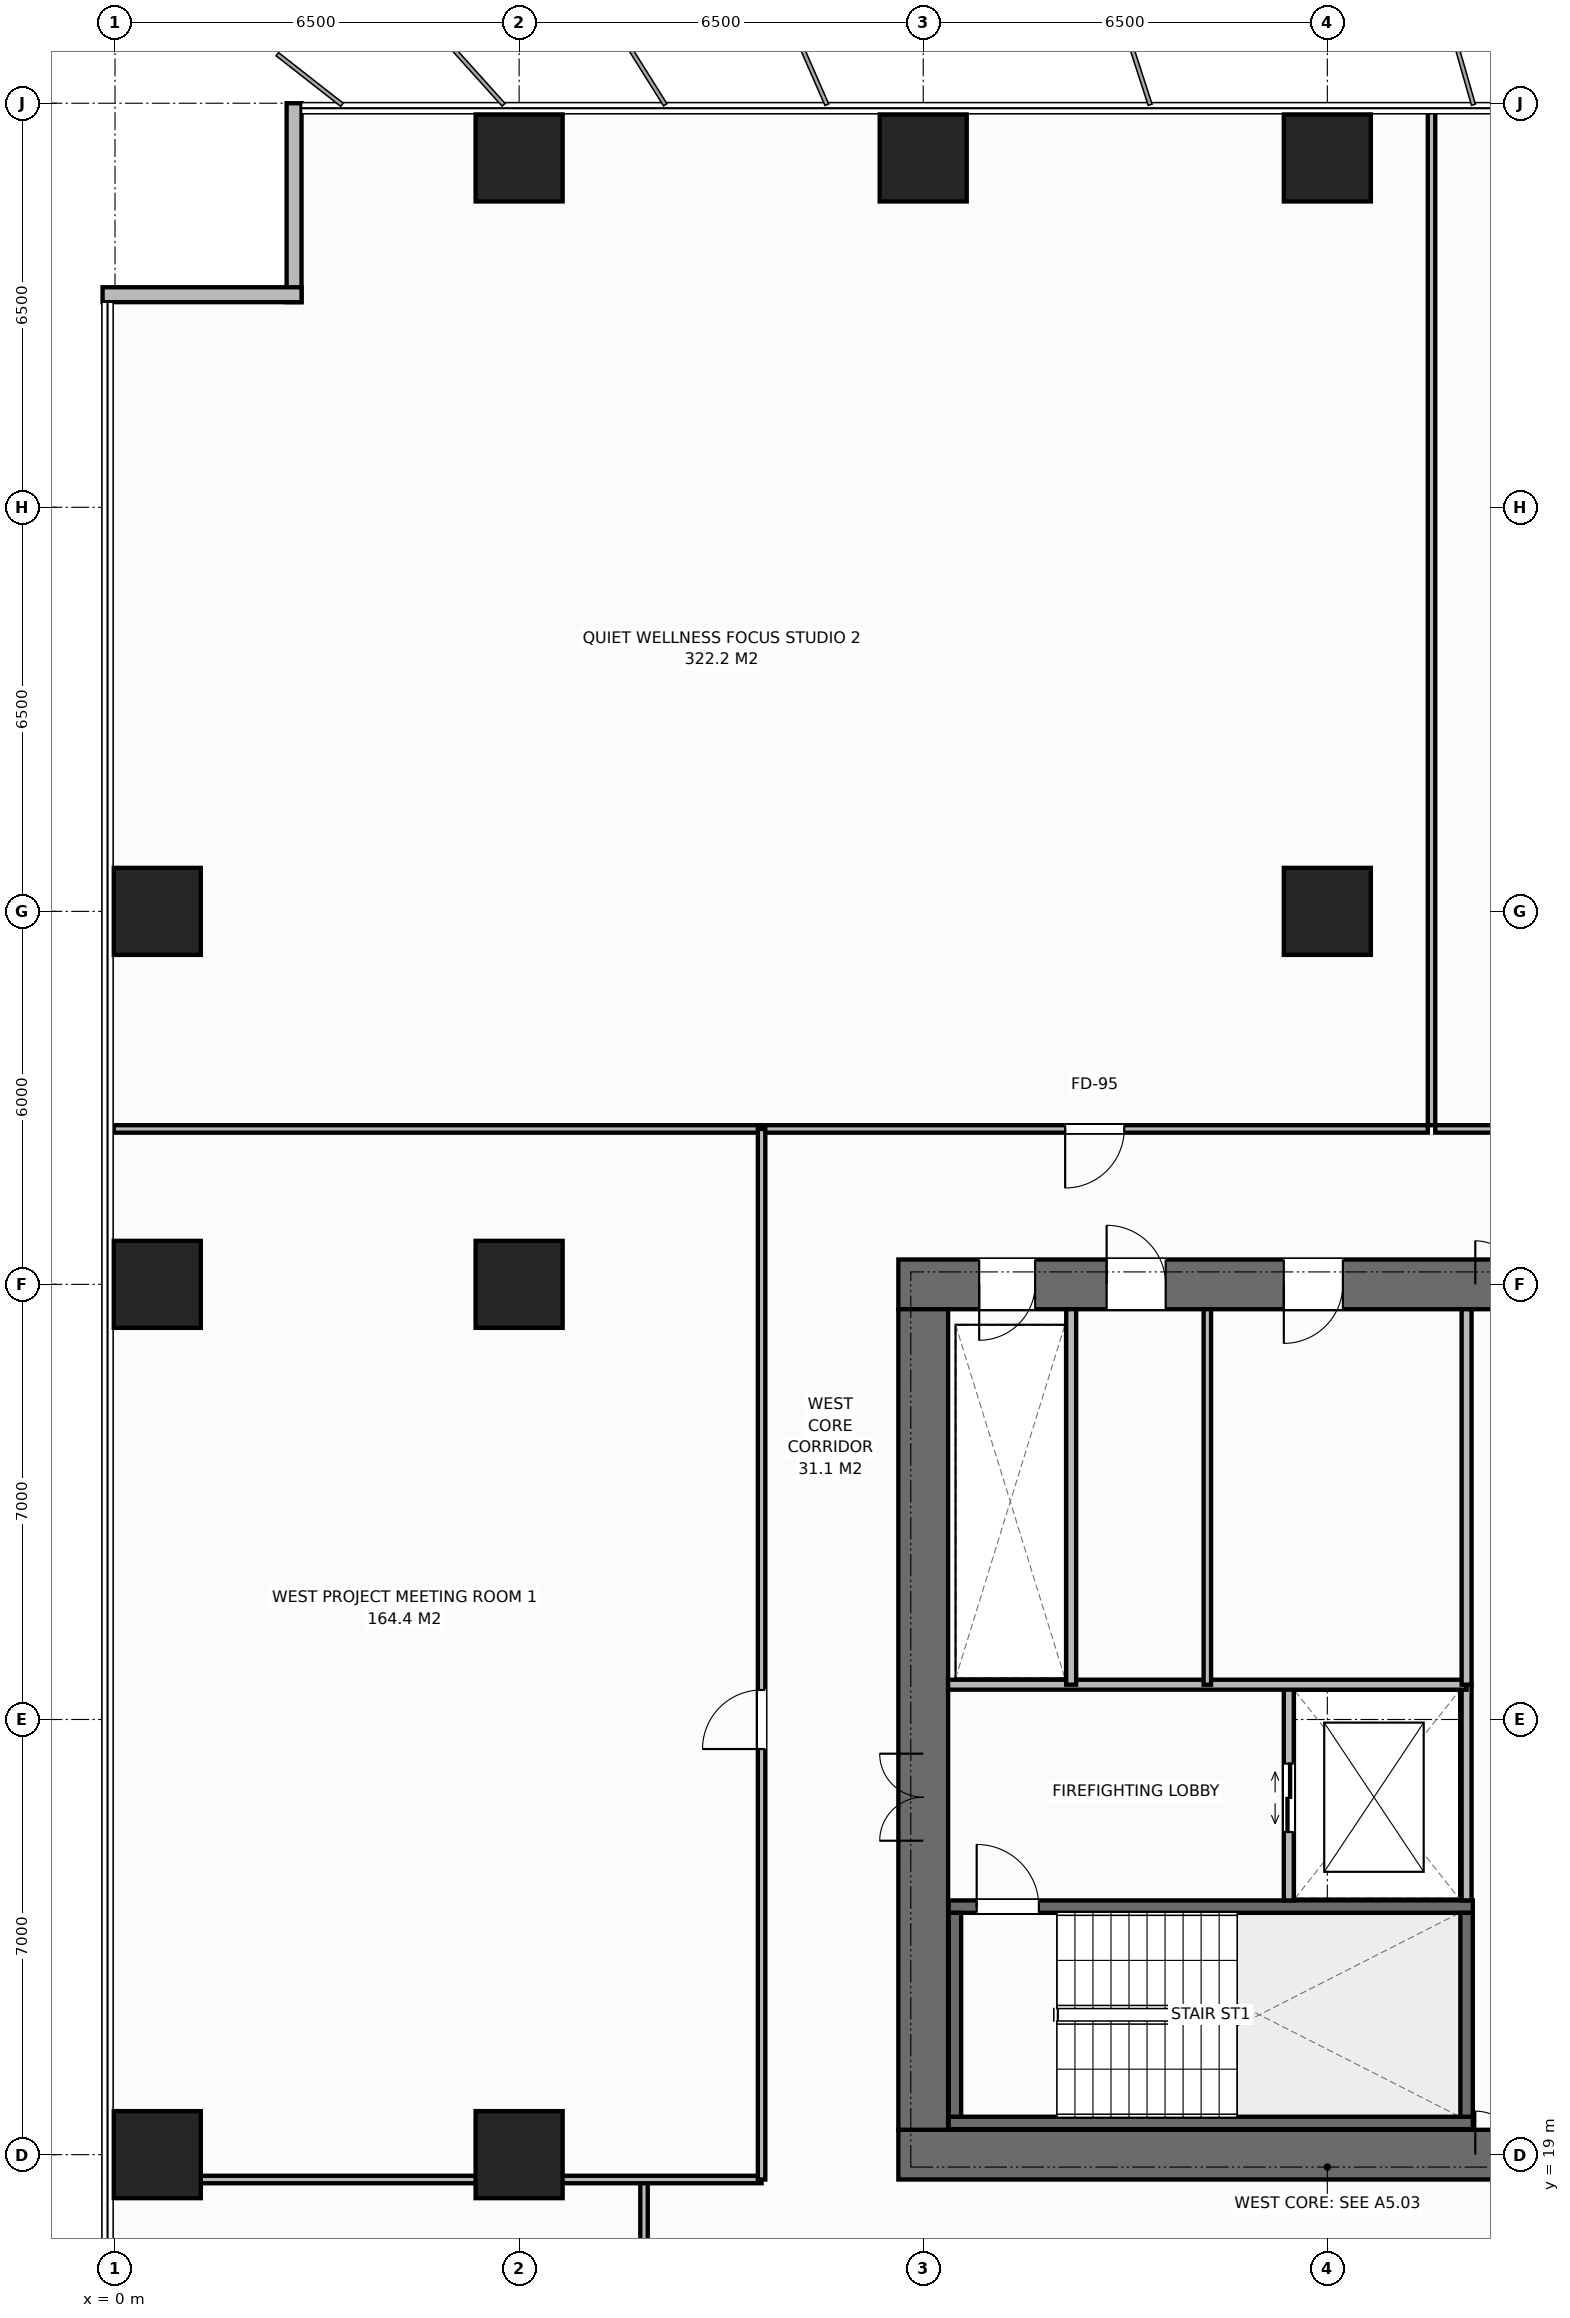
"""IFC4 building model, lengths in metres.
Left out: names, types, materials, properties, quantities, classifications, styles, units other than length and angle.
Written with IfcOpenShell. Run it as: python <this file> out.ifc"""

import sys

from ifc_helpers import new_model, si_unit, direction, frame, frame_2d, origin, origin_2d, place, context, subcontext, project, spatial, rectangle, extrude, element, fill, save


model = new_model("IFC4")
c1 = context("Model", 3, precision=1e-05, world=origin(), true_north=direction((0.0, 1.0)))
c2 = subcontext(c1, "Body", "Model", "MODEL_VIEW")
j1 = project(units=[si_unit("LENGTHUNIT", "METRE"), si_unit("PLANEANGLEUNIT", "RADIAN")], contexts=[c1])
p1 = place(None, origin())
s1 = spatial("IfcSite", under=j1, at=p1, CompositionType="ELEMENT")
p2 = place(p1, origin())
s2 = spatial("IfcBuilding", under=s1, at=p2, CompositionType="ELEMENT")
p3 = place(p2, frame((0.0, 0.0, 65.8)))
s3 = spatial("IfcBuildingStorey", under=s2, at=p3, CompositionType="ELEMENT", Elevation=65.8)
p4 = place(p3, frame((12.6, 19.0, 0.0), z_axis=(0.0, 0.0, 1.0), x_axis=(1.0, 0.0, 0.0)))
e1 = element("IfcWall", 1, at=p4, inside=s3, PredefinedType="SHEAR", context=c2, shape_type="SweptSolid", body=[
    extrude(rectangle(XDim=13.8, YDim=0.8, at=frame_2d((6.9, 0.0))), origin(), (0.0, 0.0, 1.0), 3.8),
])
p5 = place(p4, frame((9.28, 0.0, 0.0)))
e2 = element("IfcOpeningElement", 2, at=p5, cuts=e1, PredefinedType="OPENING", context=c2, shape_type="SweptSolid", body=[
    extrude(rectangle(XDim=1.4, YDim=2.2, at=frame_2d((0.7, 1.1))), frame((0.0, 0.41, 0.0), z_axis=(0.0, -1.0, 0.0), x_axis=(1.0, 0.0, 0.0)), (0.0, 0.0, 1.0), 0.82),
])
p6 = place(p3, frame((12.6, 33.0, 0.0), z_axis=(0.0, 0.0, 1.0), x_axis=(1.0, 0.0, 0.0)))
e3 = element("IfcWall", 3, at=p6, inside=s3, PredefinedType="SHEAR", context=c2, shape_type="SweptSolid", body=[
    extrude(rectangle(XDim=13.8, YDim=0.8, at=frame_2d((6.9, 0.0))), origin(), (0.0, 0.0, 1.0), 3.8),
])
p7 = place(p6, frame((1.3, 0.0, 0.0)))
e4 = element("IfcOpeningElement", 4, at=p7, cuts=e3, PredefinedType="OPENING", context=c2, shape_type="SweptSolid", body=[
    extrude(rectangle(XDim=0.9, YDim=2.15, at=frame_2d((0.45, 1.075))), frame((0.0, 0.41, 0.0), z_axis=(0.0, -1.0, 0.0), x_axis=(1.0, 0.0, 0.0)), (0.0, 0.0, 1.0), 0.82),
])
p8 = place(p6, frame((3.35, 0.0, 0.0)))
e5 = element("IfcOpeningElement", 5, at=p8, cuts=e3, PredefinedType="OPENING", context=c2, shape_type="SweptSolid", body=[
    extrude(rectangle(XDim=0.95, YDim=2.15, at=frame_2d((0.475, 1.075))), frame((0.0, 0.41, 0.0), z_axis=(0.0, -1.0, 0.0), x_axis=(1.0, 0.0, 0.0)), (0.0, 0.0, 1.0), 0.82),
])
p9 = place(p6, frame((6.2, 0.0, 0.0)))
e6 = element("IfcOpeningElement", 6, at=p9, cuts=e3, PredefinedType="OPENING", context=c2, shape_type="SweptSolid", body=[
    extrude(rectangle(XDim=0.95, YDim=2.15, at=frame_2d((0.475, 1.075))), frame((0.0, 0.41, 0.0), z_axis=(0.0, -1.0, 0.0), x_axis=(1.0, 0.0, 0.0)), (0.0, 0.0, 1.0), 0.82),
])
p10 = place(p6, frame((9.28, 0.0, 0.0)))
e7 = element("IfcOpeningElement", 7, at=p10, cuts=e3, PredefinedType="OPENING", context=c2, shape_type="SweptSolid", body=[
    extrude(rectangle(XDim=1.4, YDim=2.2, at=frame_2d((0.7, 1.1))), frame((0.0, 0.41, 0.0), z_axis=(0.0, -1.0, 0.0), x_axis=(1.0, 0.0, 0.0)), (0.0, 0.0, 1.0), 0.82),
])
p11 = place(p3, frame((13.0, 19.4, 0.0), z_axis=(0.0, 0.0, 1.0), x_axis=(0.0, 1.0, 0.0)))
e8 = element("IfcWall", 8, at=p11, inside=s3, PredefinedType="SHEAR", context=c2, shape_type="SweptSolid", body=[
    extrude(rectangle(XDim=13.2, YDim=0.8, at=frame_2d((6.6, 0.0))), origin(), (0.0, 0.0, 1.0), 3.8),
])
p12 = place(p11, frame((4.65, 0.0, 0.0)))
e9 = element("IfcOpeningElement", 9, at=p12, cuts=e8, PredefinedType="OPENING", context=c2, shape_type="SweptSolid", body=[
    extrude(rectangle(XDim=1.4, YDim=2.2, at=frame_2d((0.7, 1.1))), frame((0.0, 0.41, 0.0), z_axis=(0.0, -1.0, 0.0), x_axis=(1.0, 0.0, 0.0)), (0.0, 0.0, 1.0), 0.82),
])
p13 = place(p3, frame((13.41, 19.51, 0.0), z_axis=(0.0, 0.0, 1.0), x_axis=(1.0, 0.0, 0.0)))
e10 = element("IfcWall", 10, at=p13, inside=s3, PredefinedType="SHEAR", context=c2, shape_type="SweptSolid", body=[
    extrude(rectangle(XDim=8.43, YDim=0.2, at=frame_2d((4.215, 0.0))), origin(), (0.0, 0.0, 1.0), 3.8),
])
p14 = place(p3, frame((13.41, 22.99, 0.0), z_axis=(0.0, 0.0, 1.0), x_axis=(1.0, 0.0, 0.0)))
e11 = element("IfcWall", 11, at=p14, inside=s3, PredefinedType="SHEAR", context=c2, shape_type="SweptSolid", body=[
    extrude(rectangle(XDim=8.43, YDim=0.2, at=frame_2d((4.215, 0.0))), origin(), (0.0, 0.0, 1.0), 3.8),
])
p15 = place(p14, frame((0.45, 0.0, 0.0)))
e12 = element("IfcOpeningElement", 12, at=p15, cuts=e11, PredefinedType="OPENING", context=c2, shape_type="SweptSolid", body=[
    extrude(rectangle(XDim=1.0, YDim=2.15, at=frame_2d((0.5, 1.075))), frame((0.0, 0.11, 0.0), z_axis=(0.0, -1.0, 0.0), x_axis=(1.0, 0.0, 0.0)), (0.0, 0.0, 1.0), 0.22),
])
for number, where, z_axis, x_axis in (
    (13, (13.51, 19.61, 0.0), (0.0, 0.0, 1.0), (0.0, 1.0, 0.0)),
    (14, (21.74, 19.61, 0.0), (0.0, 0.0, 1.0), (0.0, 1.0, 0.0)),
):
    element("IfcWall", number, at=place(p3, frame(where, z_axis=z_axis, x_axis=x_axis)), inside=s3, PredefinedType="SHEAR", context=c2, shape_type="SweptSolid", body=[
        extrude(rectangle(XDim=3.28, YDim=0.2, at=frame_2d((1.64, 0.0))), origin(), (0.0, 0.0, 1.0), 3.8),
    ])
for number, where, z_axis, x_axis in (
    (15, (19.5, 39.0, 0.0), (0.0, 0.0, 1.0), (1.0, 0.0, 0.0)),
    (16, (6.5, 19.0, 0.0), (0.0, 0.0, 1.0), (1.0, 0.0, 0.0)),
    (17, (6.5, 33.0, 0.0), (0.0, 0.0, 1.0), (1.0, 0.0, 0.0)),
    (18, (6.5, 51.12, 0.0), (0.0, 0.0, 1.0), (1.0, 0.0, 0.0)),
    (19, (13.0, 51.12, 0.0), (0.0, 0.0, 1.0), (1.0, 0.0, 0.0)),
    (20, (19.5, 51.12, 0.0), (0.0, 0.0, 1.0), (1.0, 0.0, 0.0)),
    (21, (0.68, 19.0, 0.0), (0.0, 0.0, 1.0), (1.0, 0.0, 0.0)),
    (22, (0.68, 33.0, 0.0), (0.0, 0.0, 1.0), (1.0, 0.0, 0.0)),
    (23, (0.68, 39.0, 0.0), (0.0, 0.0, 1.0), (1.0, 0.0, 0.0)),
):
    element("IfcColumn", number, at=place(p3, frame(where, z_axis=z_axis, x_axis=x_axis)), inside=s3, PredefinedType="COLUMN", context=c2, shape_type="SweptSolid", body=[
        extrude(rectangle(XDim=1.4, YDim=1.4, at=origin_2d()), origin(), (0.0, 0.0, 1.0), 3.8),
    ])
for number, where, z_axis, x_axis in (
    (24, (2.88, 48.8, 0.0), (0.0, 0.0, 1.0), (0.0, 1.0, 0.0)),
    (25, (-0.2, 48.92, 0.0), (0.0, 0.0, 1.0), (1.0, 0.0, 0.0)),
):
    element("IfcWall", number, at=place(p3, frame(where, z_axis=z_axis, x_axis=x_axis)), inside=s3, PredefinedType="STANDARD", context=c2, shape_type="SweptSolid", body=[
        extrude(rectangle(XDim=3.2, YDim=0.24, at=frame_2d((1.6, 0.0))), origin(), (0.0, 0.0, 1.0), 3.55),
    ])
p16 = place(p3, frame((21.74, 23.09, 0.0), z_axis=(0.0, 0.0, 1.0), x_axis=(0.0, 1.0, 0.0)))
e26 = element("IfcWall", 26, at=p16, inside=s3, PredefinedType="STANDARD", context=c2, shape_type="SweptSolid", body=[
    extrude(rectangle(XDim=3.47, YDim=0.16, at=frame_2d((1.735, 0.0))), origin(), (0.0, 0.0, 1.0), 3.55),
])
p17 = place(p3, frame((18.88, 23.09, 0.0), z_axis=(0.0, 0.0, 1.0), x_axis=(0.0, 1.0, 0.0)))
e27 = element("IfcWall", 27, at=p17, inside=s3, PredefinedType="STANDARD", context=c2, shape_type="SweptSolid", body=[
    extrude(rectangle(XDim=3.47, YDim=0.16, at=frame_2d((1.735, 0.0))), origin(), (0.0, 0.0, 1.0), 3.55),
])
p18 = place(p17, frame((1.1, 0.0, 0.0)))
e28 = element("IfcOpeningElement", 28, at=p18, cuts=e27, PredefinedType="OPENING", context=c2, shape_type="SweptSolid", body=[
    extrude(rectangle(XDim=1.1, YDim=2.2, at=frame_2d((0.55, 1.1))), frame((0.0, 0.09, 0.0), z_axis=(0.0, -1.0, 0.0), x_axis=(1.0, 0.0, 0.0)), (0.0, 0.0, 1.0), 0.18),
])
p19 = place(p3, frame((13.4, 26.56, 0.0), z_axis=(0.0, 0.0, 1.0), x_axis=(1.0, 0.0, 0.0)))
e29 = element("IfcWall", 29, at=p19, inside=s3, PredefinedType="STANDARD", context=c2, shape_type="SweptSolid", body=[
    extrude(rectangle(XDim=8.34, YDim=0.16, at=frame_2d((4.17, 0.0))), origin(), (0.0, 0.0, 1.0), 3.55),
])
p20 = place(p3, frame((15.38, 26.56, 0.0), z_axis=(0.0, 0.0, 1.0), x_axis=(0.0, 1.0, 0.0)))
e30 = element("IfcWall", 30, at=p20, inside=s3, PredefinedType="STANDARD", context=c2, shape_type="SweptSolid", body=[
    extrude(rectangle(XDim=6.04, YDim=0.16, at=frame_2d((3.02, 0.0))), origin(), (0.0, 0.0, 1.0), 3.55),
])
p21 = place(p3, frame((17.57, 26.56, 0.0), z_axis=(0.0, 0.0, 1.0), x_axis=(0.0, 1.0, 0.0)))
e31 = element("IfcWall", 31, at=p21, inside=s3, PredefinedType="PARTITIONING", context=c2, shape_type="SweptSolid", body=[
    extrude(rectangle(XDim=6.04, YDim=0.12, at=frame_2d((3.02, 0.0))), origin(), (0.0, 0.0, 1.0), 3.55),
])
p22 = place(p3, frame((21.74, 26.56, 0.0), z_axis=(0.0, 0.0, 1.0), x_axis=(0.0, 1.0, 0.0)))
e32 = element("IfcWall", 32, at=p22, inside=s3, PredefinedType="STANDARD", context=c2, shape_type="SweptSolid", body=[
    extrude(rectangle(XDim=6.04, YDim=0.16, at=frame_2d((3.02, 0.0))), origin(), (0.0, 0.0, 1.0), 3.55),
])
p23 = place(p3, frame((8.509, 16.5, 0.0), z_axis=(0.0, 0.0, 1.0), x_axis=(0.0, 1.0, 0.0)))
e33 = element("IfcWall", 33, at=p23, inside=s3, PredefinedType="PARTITIONING", context=c2, shape_type="SweptSolid", body=[
    extrude(rectangle(XDim=2.1, YDim=0.12, at=frame_2d((1.05, 0.0))), origin(), (0.0, 0.0, 1.0), 3.55),
])
p24 = place(p3, frame((21.176, 35.56, 0.0), z_axis=(0.0, 0.0, 1.0), x_axis=(0.0, 1.0, 0.0)))
e34 = element("IfcWall", 34, at=p24, inside=s3, PredefinedType="PARTITIONING", context=c2, shape_type="SweptSolid", body=[
    extrude(rectangle(XDim=16.42, YDim=0.12, at=frame_2d((8.21, 0.0))), origin(), (0.0, 0.0, 1.0), 3.55),
])
p25 = place(p3, frame((-0.02, 35.5, 0.0), z_axis=(0.0, 0.0, 1.0), x_axis=(1.0, 0.0, 0.0)))
e35 = element("IfcWall", 35, at=p25, inside=s3, PredefinedType="PARTITIONING", context=c2, shape_type="SweptSolid", body=[
    extrude(rectangle(XDim=21.136, YDim=0.12, at=frame_2d((10.568, 0.0))), origin(), (0.0, 0.0, 1.0), 3.55),
])
p26 = place(p25, frame((15.303, 0.0, 0.0)))
e36 = element("IfcOpeningElement", 36, at=p26, cuts=e35, PredefinedType="OPENING", context=c2, shape_type="SweptSolid", body=[
    extrude(rectangle(XDim=0.95, YDim=2.15, at=frame_2d((0.475, 1.075))), frame((0.0, 0.07, 0.0), z_axis=(0.0, -1.0, 0.0), x_axis=(1.0, 0.0, 0.0)), (0.0, 0.0, 1.0), 0.14),
])
p27 = place(p3, frame((21.236, 35.5, 0.0), z_axis=(0.0, 0.0, 1.0), x_axis=(1.0, 0.0, 0.0)))
e37 = element("IfcWall", 37, at=p27, inside=s3, PredefinedType="PARTITIONING", context=c2, shape_type="SweptSolid", body=[
    extrude(rectangle(XDim=13.233, YDim=0.12, at=frame_2d((6.616, 0.0))), origin(), (0.0, 0.0, 1.0), 3.55),
])
p28 = place(p27, frame((6.141, 0.0, 0.0)))
e38 = element("IfcOpeningElement", 38, at=p28, cuts=e37, PredefinedType="OPENING", context=c2, shape_type="SweptSolid", body=[
    extrude(rectangle(XDim=0.95, YDim=2.15, at=frame_2d((0.475, 1.075))), frame((0.0, 0.07, 0.0), z_axis=(0.0, -1.0, 0.0), x_axis=(1.0, 0.0, 0.0)), (0.0, 0.0, 1.0), 0.14),
])
p29 = place(p3, frame((-0.18, 18.6, 0.0), z_axis=(0.0, 0.0, 1.0), x_axis=(1.0, 0.0, 0.0)))
e39 = element("IfcWall", 39, at=p29, inside=s3, PredefinedType="PARTITIONING", context=c2, shape_type="SweptSolid", body=[
    extrude(rectangle(XDim=10.58, YDim=0.12, at=frame_2d((5.29, 0.0))), origin(), (0.0, 0.0, 1.0), 3.55),
])
p30 = place(p3, frame((10.4, 18.6, 0.0), z_axis=(0.0, 0.0, 1.0), x_axis=(0.0, 1.0, 0.0)))
e40 = element("IfcWall", 40, at=p30, inside=s3, PredefinedType="PARTITIONING", context=c2, shape_type="SweptSolid", body=[
    extrude(rectangle(XDim=16.9, YDim=0.12, at=frame_2d((8.45, 0.0))), origin(), (0.0, 0.0, 1.0), 3.55),
])
p31 = place(p30, frame((6.925, 0.0, 0.0)))
e41 = element("IfcOpeningElement", 41, at=p31, cuts=e40, PredefinedType="OPENING", context=c2, shape_type="SweptSolid", body=[
    extrude(rectangle(XDim=0.95, YDim=2.15, at=frame_2d((0.475, 1.075))), frame((0.0, 0.07, 0.0), z_axis=(0.0, -1.0, 0.0), x_axis=(1.0, 0.0, 0.0)), (0.0, 0.0, 1.0), 0.14),
])
p32 = place(p15, origin())
e42 = element("IfcDoor", 42, at=p32, inside=s3, OperationType="SINGLE_SWING_LEFT", PredefinedType="DOOR", context=c2, shape_type="SweptSolid", body=[
    extrude(rectangle(XDim=1.0, YDim=2.15, at=frame_2d((0.5, 1.075))), frame((0.0, 0.025, 0.0), z_axis=(0.0, -1.0, 0.0), x_axis=(1.0, 0.0, 0.0)), (0.0, 0.0, 1.0), 0.05),
])
fill(e12, e42)
p33 = place(p12, origin())
e43 = element("IfcDoor", 43, at=p33, inside=s3, OperationType="DOUBLE_DOOR_SINGLE_SWING", PredefinedType="DOOR", context=c2, shape_type="SweptSolid", body=[
    extrude(rectangle(XDim=1.4, YDim=2.2, at=frame_2d((0.7, 1.1))), frame((0.0, 0.025, 0.0), z_axis=(0.0, -1.0, 0.0), x_axis=(1.0, 0.0, 0.0)), (0.0, 0.0, 1.0), 0.05),
])
fill(e9, e43)
p34 = place(p18, origin())
e44 = element("IfcDoor", 44, at=p34, inside=s3, OperationType="DOUBLE_DOOR_SLIDING", PredefinedType="DOOR", context=c2, shape_type="SweptSolid", body=[
    extrude(rectangle(XDim=1.1, YDim=2.2, at=frame_2d((0.55, 1.1))), frame((0.0, 0.025, 0.0), z_axis=(0.0, -1.0, 0.0), x_axis=(1.0, 0.0, 0.0)), (0.0, 0.0, 1.0), 0.05),
])
fill(e28, e44)
p35 = place(p7, origin())
e45 = element("IfcDoor", 45, at=p35, inside=s3, OperationType="SINGLE_SWING_RIGHT", PredefinedType="DOOR", context=c2, shape_type="SweptSolid", body=[
    extrude(rectangle(XDim=0.9, YDim=2.15, at=frame_2d((0.45, 1.075))), frame((0.0, -0.075, 0.0), z_axis=(0.0, -1.0, 0.0), x_axis=(1.0, 0.0, 0.0)), (0.0, 0.0, 1.0), 0.05),
])
fill(e4, e45)
p36 = place(p8, origin())
e46 = element("IfcDoor", 46, at=p36, inside=s3, OperationType="SINGLE_SWING_LEFT", PredefinedType="DOOR", context=c2, shape_type="SweptSolid", body=[
    extrude(rectangle(XDim=0.95, YDim=2.15, at=frame_2d((0.475, 1.075))), frame((0.0, -0.075, 0.0), z_axis=(0.0, -1.0, 0.0), x_axis=(1.0, 0.0, 0.0)), (0.0, 0.0, 1.0), 0.05),
])
fill(e5, e46)
p37 = place(p9, origin())
e47 = element("IfcDoor", 47, at=p37, inside=s3, OperationType="SINGLE_SWING_RIGHT", PredefinedType="DOOR", context=c2, shape_type="SweptSolid", body=[
    extrude(rectangle(XDim=0.95, YDim=2.15, at=frame_2d((0.475, 1.075))), frame((0.0, -0.075, 0.0), z_axis=(0.0, -1.0, 0.0), x_axis=(1.0, 0.0, 0.0)), (0.0, 0.0, 1.0), 0.05),
])
fill(e6, e47)
p38 = place(p5, origin())
e48 = element("IfcDoor", 48, at=p38, inside=s3, OperationType="DOUBLE_DOOR_SINGLE_SWING", PredefinedType="DOOR", context=c2, shape_type="SweptSolid", body=[
    extrude(rectangle(XDim=1.4, YDim=2.2, at=frame_2d((0.7, 1.1))), frame((0.0, 0.125, 0.0), z_axis=(0.0, -1.0, 0.0), x_axis=(1.0, 0.0, 0.0)), (0.0, 0.0, 1.0), 0.05),
])
fill(e2, e48)
p39 = place(p10, origin())
e49 = element("IfcDoor", 49, at=p39, inside=s3, OperationType="DOUBLE_DOOR_SINGLE_SWING", PredefinedType="DOOR", context=c2, shape_type="SweptSolid", body=[
    extrude(rectangle(XDim=1.4, YDim=2.2, at=frame_2d((0.7, 1.1))), frame((0.0, -0.075, 0.0), z_axis=(0.0, -1.0, 0.0), x_axis=(1.0, 0.0, 0.0)), (0.0, 0.0, 1.0), 0.05),
])
fill(e7, e49)
p40 = place(p26, origin())
e50 = element("IfcDoor", 50, at=p40, inside=s3, OperationType="SINGLE_SWING_RIGHT", PredefinedType="DOOR", context=c2, shape_type="SweptSolid", body=[
    extrude(rectangle(XDim=0.95, YDim=2.15, at=frame_2d((0.475, 1.075))), frame((0.0, 0.025, 0.0), z_axis=(0.0, -1.0, 0.0), x_axis=(1.0, 0.0, 0.0)), (0.0, 0.0, 1.0), 0.05),
])
fill(e36, e50)
p41 = place(p31, origin())
e51 = element("IfcDoor", 51, at=p41, inside=s3, OperationType="SINGLE_SWING_LEFT", PredefinedType="DOOR", context=c2, shape_type="SweptSolid", body=[
    extrude(rectangle(XDim=0.95, YDim=2.15, at=frame_2d((0.475, 1.075))), frame((0.0, 0.025, 0.0), z_axis=(0.0, -1.0, 0.0), x_axis=(1.0, 0.0, 0.0)), (0.0, 0.0, 1.0), 0.05),
])
fill(e41, e51)
save(model, sys.argv[1])
